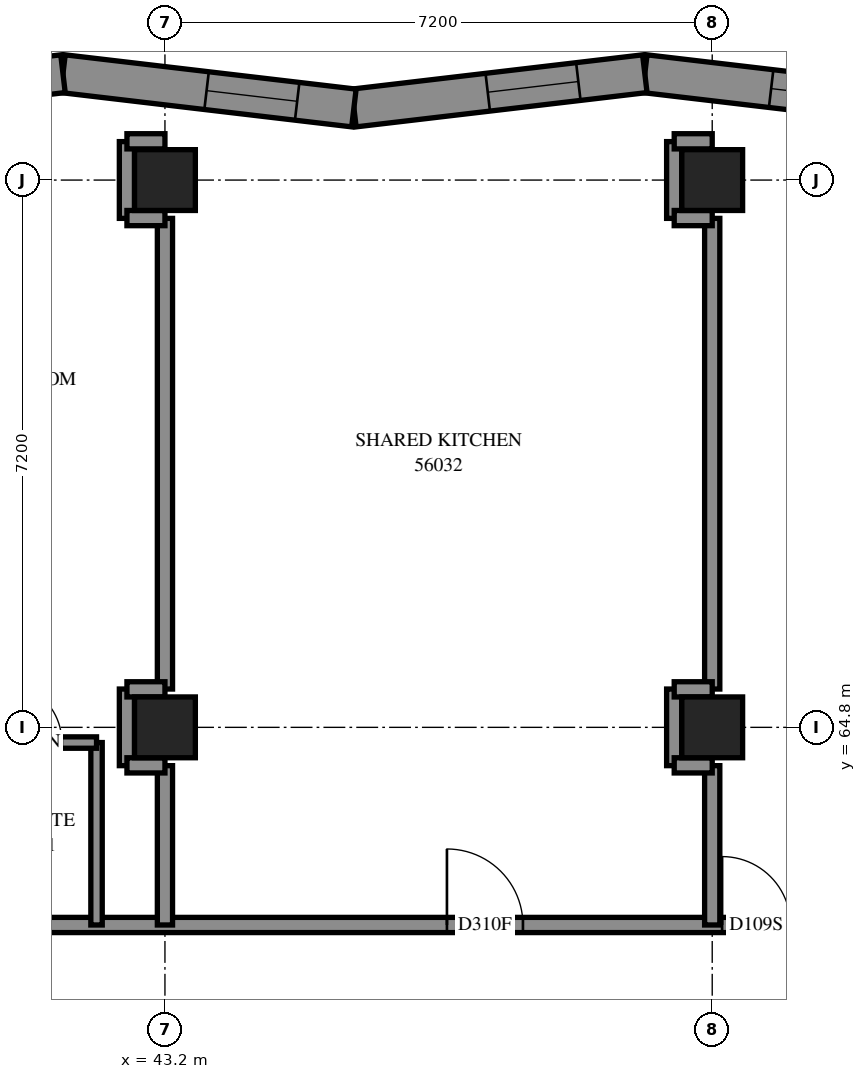
"""IFC4 building model, lengths in metres.
Left out: names, types, materials, properties, quantities, classifications, styles, units other than length and angle.
Written with IfcOpenShell. Run it as: python <this file> out.ifc"""

import sys

from ifc_helpers import new_model, si_unit, direction, frame, frame_2d, origin, origin_2d, place, context, subcontext, project, spatial, polyline, rectangle, outline, extrude, element, fill, save


model = new_model("IFC4")
c1 = context("Model", 3, precision=1e-05, world=origin(), true_north=direction((0.0, 1.0)))
c2 = subcontext(c1, "Body", "Model", "MODEL_VIEW")
j1 = project(units=[si_unit("LENGTHUNIT", "METRE"), si_unit("PLANEANGLEUNIT", "RADIAN")], contexts=[c1])
p1 = place(None, origin())
s1 = spatial("IfcSite", under=j1, at=p1, CompositionType="ELEMENT")
p2 = place(p1, origin())
s2 = spatial("IfcBuilding", under=s1, at=p2, CompositionType="ELEMENT")
p3 = place(p2, frame((0.0, 0.0, 206.6)))
s3 = spatial("IfcBuildingStorey", under=s2, at=p3, CompositionType="ELEMENT", Elevation=206.6)
for number, where, z_axis, x_axis in (
    (1, (43.2, 64.8, 0.0), (0.0, 0.0, 1.0), (1.0, 0.0, 0.0)),
    (2, (43.2, 72.0, 0.0), (0.0, 0.0, 1.0), (1.0, 0.0, 0.0)),
    (3, (50.4, 64.8, 0.0), (0.0, 0.0, 1.0), (1.0, 0.0, 0.0)),
    (4, (50.4, 72.0, 0.0), (0.0, 0.0, 1.0), (1.0, 0.0, 0.0)),
):
    element("IfcColumn", number, at=place(p3, frame(where, z_axis=z_axis, x_axis=x_axis)), inside=s3, PredefinedType="COLUMN", context=c2, shape_type="SweptSolid", body=[
        extrude(rectangle(XDim=0.8, YDim=0.8, at=origin_2d()), origin(), (0.0, 0.0, 1.0), 3.1),
    ])
p4 = place(p3, frame((53.341, 72.948, 0.0), z_axis=(0.0, 0.0, 1.0), x_axis=(-0.9931289789, 0.1170249176, 0.0)))
e5 = element("IfcWall", 5, at=p4, inside=s3, PredefinedType="SOLIDWALL", context=c2, shape_type="SweptSolid", body=[
    extrude(outline(polyline([(0.029, -0.25), (3.883, -0.25), (3.824, 0.25), (-0.029, 0.25), (0.029, -0.25)])), origin(), (0.0, 0.0, 1.0), 3.1),
])
p5 = place(p4, frame((0.981, 0.0, 0.45)))
e6 = element("IfcOpeningElement", 6, at=p5, cuts=e5, PredefinedType="OPENING", context=c2, shape_type="SweptSolid", body=[
    extrude(rectangle(XDim=1.2, YDim=2.5, at=frame_2d((0.6, 1.25))), frame((0.0, 0.26, 0.0), z_axis=(0.0, -1.0, 0.0), x_axis=(1.0, 0.0, 0.0)), (0.0, 0.0, 1.0), 0.52),
])
p6 = place(p3, frame((49.513, 73.399, 0.0), z_axis=(0.0, 0.0, 1.0), x_axis=(-0.9931289789, -0.1170249176, 0.0)))
e7 = element("IfcWall", 7, at=p6, inside=s3, PredefinedType="SOLIDWALL", context=c2, shape_type="SweptSolid", body=[
    extrude(outline(polyline([(-0.029, -0.25), (3.824, -0.25), (3.883, 0.25), (0.029, 0.25), (-0.029, -0.25)])), origin(), (0.0, 0.0, 1.0), 3.1),
])
p7 = place(p6, frame((0.881, 0.0, 0.45)))
e8 = element("IfcOpeningElement", 8, at=p7, cuts=e7, PredefinedType="OPENING", context=c2, shape_type="SweptSolid", body=[
    extrude(rectangle(XDim=1.2, YDim=2.5, at=frame_2d((0.6, 1.25))), frame((0.0, 0.26, 0.0), z_axis=(0.0, -1.0, 0.0), x_axis=(1.0, 0.0, 0.0)), (0.0, 0.0, 1.0), 0.52),
])
p8 = place(p3, frame((45.686, 72.948, 0.0), z_axis=(0.0, 0.0, 1.0), x_axis=(-0.9931286235, 0.1170279333, 0.0)))
e9 = element("IfcWall", 9, at=p8, inside=s3, PredefinedType="SOLIDWALL", context=c2, shape_type="SweptSolid", body=[
    extrude(outline(polyline([(0.029, -0.25), (3.883, -0.25), (3.824, 0.25), (-0.029, 0.25), (0.029, -0.25)])), origin(), (0.0, 0.0, 1.0), 3.1),
])
p9 = place(p8, frame((0.752, 0.0, 0.45)))
e10 = element("IfcOpeningElement", 10, at=p9, cuts=e9, PredefinedType="OPENING", context=c2, shape_type="SweptSolid", body=[
    extrude(rectangle(XDim=1.2, YDim=2.5, at=frame_2d((0.6, 1.25))), frame((0.0, 0.26, 0.0), z_axis=(0.0, -1.0, 0.0), x_axis=(1.0, 0.0, 0.0)), (0.0, 0.0, 1.0), 0.52),
])
p10 = place(p3, frame((41.859, 73.399, 0.0), z_axis=(0.0, 0.0, 1.0), x_axis=(-0.9931289789, -0.1170249176, 0.0)))
e11 = element("IfcWall", 11, at=p10, inside=s3, PredefinedType="SOLIDWALL", context=c2, shape_type="SweptSolid", body=[
    extrude(outline(polyline([(-0.029, -0.25), (3.824, -0.25), (3.883, 0.25), (0.029, 0.25), (-0.029, -0.25)])), origin(), (0.0, 0.0, 1.0), 3.1),
])
p11 = place(p10, frame((0.652, 0.0, 0.45)))
e12 = element("IfcOpeningElement", 12, at=p11, cuts=e11, PredefinedType="OPENING", context=c2, shape_type="SweptSolid", body=[
    extrude(rectangle(XDim=1.2, YDim=2.5, at=frame_2d((0.6, 1.25))), frame((0.0, 0.26, 0.0), z_axis=(0.0, -1.0, 0.0), x_axis=(1.0, 0.0, 0.0)), (0.0, 0.0, 1.0), 0.52),
])
p12 = place(p3, frame((40.602, 62.2, 0.0), z_axis=(0.0, 0.0, 1.0), x_axis=(1.0, 0.0, 0.0)))
e13 = element("IfcWall", 13, at=p12, inside=s3, PredefinedType="PARTITIONING", context=c2, shape_type="SweptSolid", body=[
    extrude(rectangle(XDim=14.998, YDim=0.2, at=frame_2d((7.499, 0.0))), origin(), (0.0, 0.0, 1.0), 3.1),
])
p13 = place(p12, frame((6.308, 0.0, 0.0)))
e14 = element("IfcOpeningElement", 14, at=p13, cuts=e13, PredefinedType="OPENING", context=c2, shape_type="SweptSolid", body=[
    extrude(rectangle(XDim=1.0, YDim=2.1, at=frame_2d((0.5, 1.05))), frame((0.0, 0.11, 0.0), z_axis=(0.0, -1.0, 0.0), x_axis=(1.0, 0.0, 0.0)), (0.0, 0.0, 1.0), 0.22),
])
p14 = place(p12, frame((9.928, 0.0, 0.0)))
e15 = element("IfcOpeningElement", 15, at=p14, cuts=e13, PredefinedType="OPENING", context=c2, shape_type="SweptSolid", body=[
    extrude(rectangle(XDim=0.9, YDim=2.1, at=frame_2d((0.45, 1.05))), frame((0.0, 0.11, 0.0), z_axis=(0.0, -1.0, 0.0), x_axis=(1.0, 0.0, 0.0)), (0.0, 0.0, 1.0), 0.22),
])
p15 = place(p12, frame((13.746, 0.0, 0.0)))
e16 = element("IfcOpeningElement", 16, at=p15, cuts=e13, PredefinedType="OPENING", context=c2, shape_type="SweptSolid", body=[
    extrude(rectangle(XDim=1.0, YDim=2.1, at=frame_2d((0.5, 1.05))), frame((0.0, 0.11, 0.0), z_axis=(0.0, -1.0, 0.0), x_axis=(1.0, 0.0, 0.0)), (0.0, 0.0, 1.0), 0.22),
])
for number, where, z_axis, x_axis in (
    (17, (43.2, 65.304, 0.0), (0.0, 0.0, 1.0), (0.0, 1.0, 0.0)),
    (18, (50.4, 65.304, 0.0), (0.0, 0.0, 1.0), (0.0, 1.0, 0.0)),
):
    element("IfcWall", number, at=place(p3, frame(where, z_axis=z_axis, x_axis=x_axis)), inside=s3, PredefinedType="PARTITIONING", context=c2, shape_type="SweptSolid", body=[
        extrude(rectangle(XDim=6.192, YDim=0.2, at=frame_2d((3.096, 0.0))), origin(), (0.0, 0.0, 1.0), 3.1),
    ])
p16 = place(p3, frame((42.3, 62.2, 0.0), z_axis=(0.0, 0.0, 1.0), x_axis=(0.0, 1.0, 0.0)))
e19 = element("IfcWall", 19, at=p16, inside=s3, PredefinedType="PARTITIONING", context=c2, shape_type="SweptSolid", body=[
    extrude(rectangle(XDim=2.4, YDim=0.15, at=frame_2d((1.2, 0.0))), origin(), (0.0, 0.0, 1.0), 3.1),
])
for number, where, z_axis, x_axis in (
    (20, (43.2, 62.2, 0.0), (0.0, 0.0, 1.0), (0.0, 1.0, 0.0)),
    (21, (50.4, 62.2, 0.0), (0.0, 0.0, 1.0), (0.0, 1.0, 0.0)),
):
    element("IfcWall", number, at=place(p3, frame(where, z_axis=z_axis, x_axis=x_axis)), inside=s3, PredefinedType="PARTITIONING", context=c2, shape_type="SweptSolid", body=[
        extrude(rectangle(XDim=2.096, YDim=0.2, at=frame_2d((1.048, 0.0))), origin(), (0.0, 0.0, 1.0), 3.1),
    ])
p17 = place(p3, frame((40.6, 64.6, 0.0), z_axis=(0.0, 0.0, 1.0), x_axis=(1.0, 0.0, 0.0)))
e22 = element("IfcWall", 22, at=p17, inside=s3, PredefinedType="PARTITIONING", context=c2, shape_type="SweptSolid", body=[
    extrude(rectangle(XDim=1.7, YDim=0.15, at=frame_2d((0.85, 0.0))), origin(), (0.0, 0.0, 1.0), 3.1),
])
p18 = place(p17, frame((0.444, 0.0, 0.0)))
e23 = element("IfcOpeningElement", 23, at=p18, cuts=e22, PredefinedType="OPENING", context=c2, shape_type="SweptSolid", body=[
    extrude(rectangle(XDim=0.8, YDim=2.1, at=frame_2d((0.4, 1.05))), frame((0.0, 0.085, 0.0), z_axis=(0.0, -1.0, 0.0), x_axis=(1.0, 0.0, 0.0)), (0.0, 0.0, 1.0), 0.17),
])
for number, where, z_axis, x_axis in (
    (24, (42.7, 71.496, 0.0), (0.0, 0.0, 1.0), (0.0, 1.0, 0.0)),
    (25, (49.9, 71.496, 0.0), (0.0, 0.0, 1.0), (0.0, 1.0, 0.0)),
):
    element("IfcWall", number, at=place(p3, frame(where, z_axis=z_axis, x_axis=x_axis)), inside=s3, PredefinedType="PARTITIONING", context=c2, shape_type="SweptSolid", body=[
        extrude(rectangle(XDim=1.01, YDim=0.2, at=frame_2d((0.505, 0.0))), origin(), (0.0, 0.0, 1.0), 3.1),
    ])
for number, where, z_axis, x_axis in (
    (26, (42.7, 64.296, 0.0), (0.0, 0.0, 1.0), (0.0, 1.0, 0.0)),
    (27, (49.9, 64.296, 0.0), (0.0, 0.0, 1.0), (0.0, 1.0, 0.0)),
):
    element("IfcWall", number, at=place(p3, frame(where, z_axis=z_axis, x_axis=x_axis)), inside=s3, PredefinedType="PARTITIONING", context=c2, shape_type="SweptSolid", body=[
        extrude(rectangle(XDim=1.008, YDim=0.2, at=frame_2d((0.504, 0.0))), origin(), (0.0, 0.0, 1.0), 3.1),
    ])
for number, where, z_axis, x_axis in (
    (28, (42.7, 72.51, 0.0), (0.0, 0.0, 1.0), (1.0, 0.0, 0.0)),
    (29, (49.9, 72.51, 0.0), (0.0, 0.0, 1.0), (1.0, 0.0, 0.0)),
    (30, (42.7, 71.5, 0.0), (0.0, 0.0, 1.0), (1.0, 0.0, 0.0)),
    (31, (49.9, 71.5, 0.0), (0.0, 0.0, 1.0), (1.0, 0.0, 0.0)),
    (32, (42.7, 65.3, 0.0), (0.0, 0.0, 1.0), (1.0, 0.0, 0.0)),
    (33, (49.9, 65.3, 0.0), (0.0, 0.0, 1.0), (1.0, 0.0, 0.0)),
    (34, (42.7, 64.3, 0.0), (0.0, 0.0, 1.0), (1.0, 0.0, 0.0)),
    (35, (49.9, 64.3, 0.0), (0.0, 0.0, 1.0), (1.0, 0.0, 0.0)),
):
    element("IfcWall", number, at=place(p3, frame(where, z_axis=z_axis, x_axis=x_axis)), inside=s3, PredefinedType="PARTITIONING", context=c2, shape_type="SweptSolid", body=[
        extrude(rectangle(XDim=0.5, YDim=0.2, at=frame_2d((0.25, 0.0))), origin(), (0.0, 0.0, 1.0), 3.1),
    ])
p19 = place(p5, origin())
e36 = element("IfcWindow", 36, at=p19, inside=s3, PartitioningType="SINGLE_PANEL", PredefinedType="WINDOW", context=c2, shape_type="SweptSolid", body=[
    extrude(rectangle(XDim=1.2, YDim=2.5, at=frame_2d((0.6, 1.25))), frame((0.0, 0.18, 0.0), z_axis=(0.0, -1.0, 0.0), x_axis=(1.0, 0.0, 0.0)), (0.0, 0.0, 1.0), 0.06),
])
fill(e6, e36)
p20 = place(p7, origin())
e37 = element("IfcWindow", 37, at=p20, inside=s3, PartitioningType="SINGLE_PANEL", PredefinedType="WINDOW", context=c2, shape_type="SweptSolid", body=[
    extrude(rectangle(XDim=1.2, YDim=2.5, at=frame_2d((0.6, 1.25))), frame((0.0, 0.18, 0.0), z_axis=(0.0, -1.0, 0.0), x_axis=(1.0, 0.0, 0.0)), (0.0, 0.0, 1.0), 0.06),
])
fill(e8, e37)
p21 = place(p9, origin())
e38 = element("IfcWindow", 38, at=p21, inside=s3, PartitioningType="SINGLE_PANEL", PredefinedType="WINDOW", context=c2, shape_type="SweptSolid", body=[
    extrude(rectangle(XDim=1.2, YDim=2.5, at=frame_2d((0.6, 1.25))), frame((0.0, 0.18, 0.0), z_axis=(0.0, -1.0, 0.0), x_axis=(1.0, 0.0, 0.0)), (0.0, 0.0, 1.0), 0.06),
])
fill(e10, e38)
p22 = place(p18, origin())
e39 = element("IfcDoor", 39, at=p22, inside=s3, OperationType="SINGLE_SWING_RIGHT", PredefinedType="DOOR", context=c2, shape_type="SweptSolid", body=[
    extrude(rectangle(XDim=0.8, YDim=2.1, at=frame_2d((0.4, 1.05))), frame((0.0, 0.025, 0.0), z_axis=(0.0, -1.0, 0.0), x_axis=(1.0, 0.0, 0.0)), (0.0, 0.0, 1.0), 0.05),
])
fill(e23, e39)
p23 = place(p13, origin())
e40 = element("IfcDoor", 40, at=p23, inside=s3, OperationType="SINGLE_SWING_RIGHT", PredefinedType="DOOR", context=c2, shape_type="SweptSolid", body=[
    extrude(rectangle(XDim=1.0, YDim=2.1, at=frame_2d((0.5, 1.05))), frame((0.0, 0.025, 0.0), z_axis=(0.0, -1.0, 0.0), x_axis=(1.0, 0.0, 0.0)), (0.0, 0.0, 1.0), 0.05),
])
fill(e14, e40)
p24 = place(p14, origin())
e41 = element("IfcDoor", 41, at=p24, inside=s3, OperationType="SINGLE_SWING_RIGHT", PredefinedType="DOOR", context=c2, shape_type="SweptSolid", body=[
    extrude(rectangle(XDim=0.9, YDim=2.1, at=frame_2d((0.45, 1.05))), frame((0.0, 0.025, 0.0), z_axis=(0.0, -1.0, 0.0), x_axis=(1.0, 0.0, 0.0)), (0.0, 0.0, 1.0), 0.05),
])
fill(e15, e41)
save(model, sys.argv[1])
